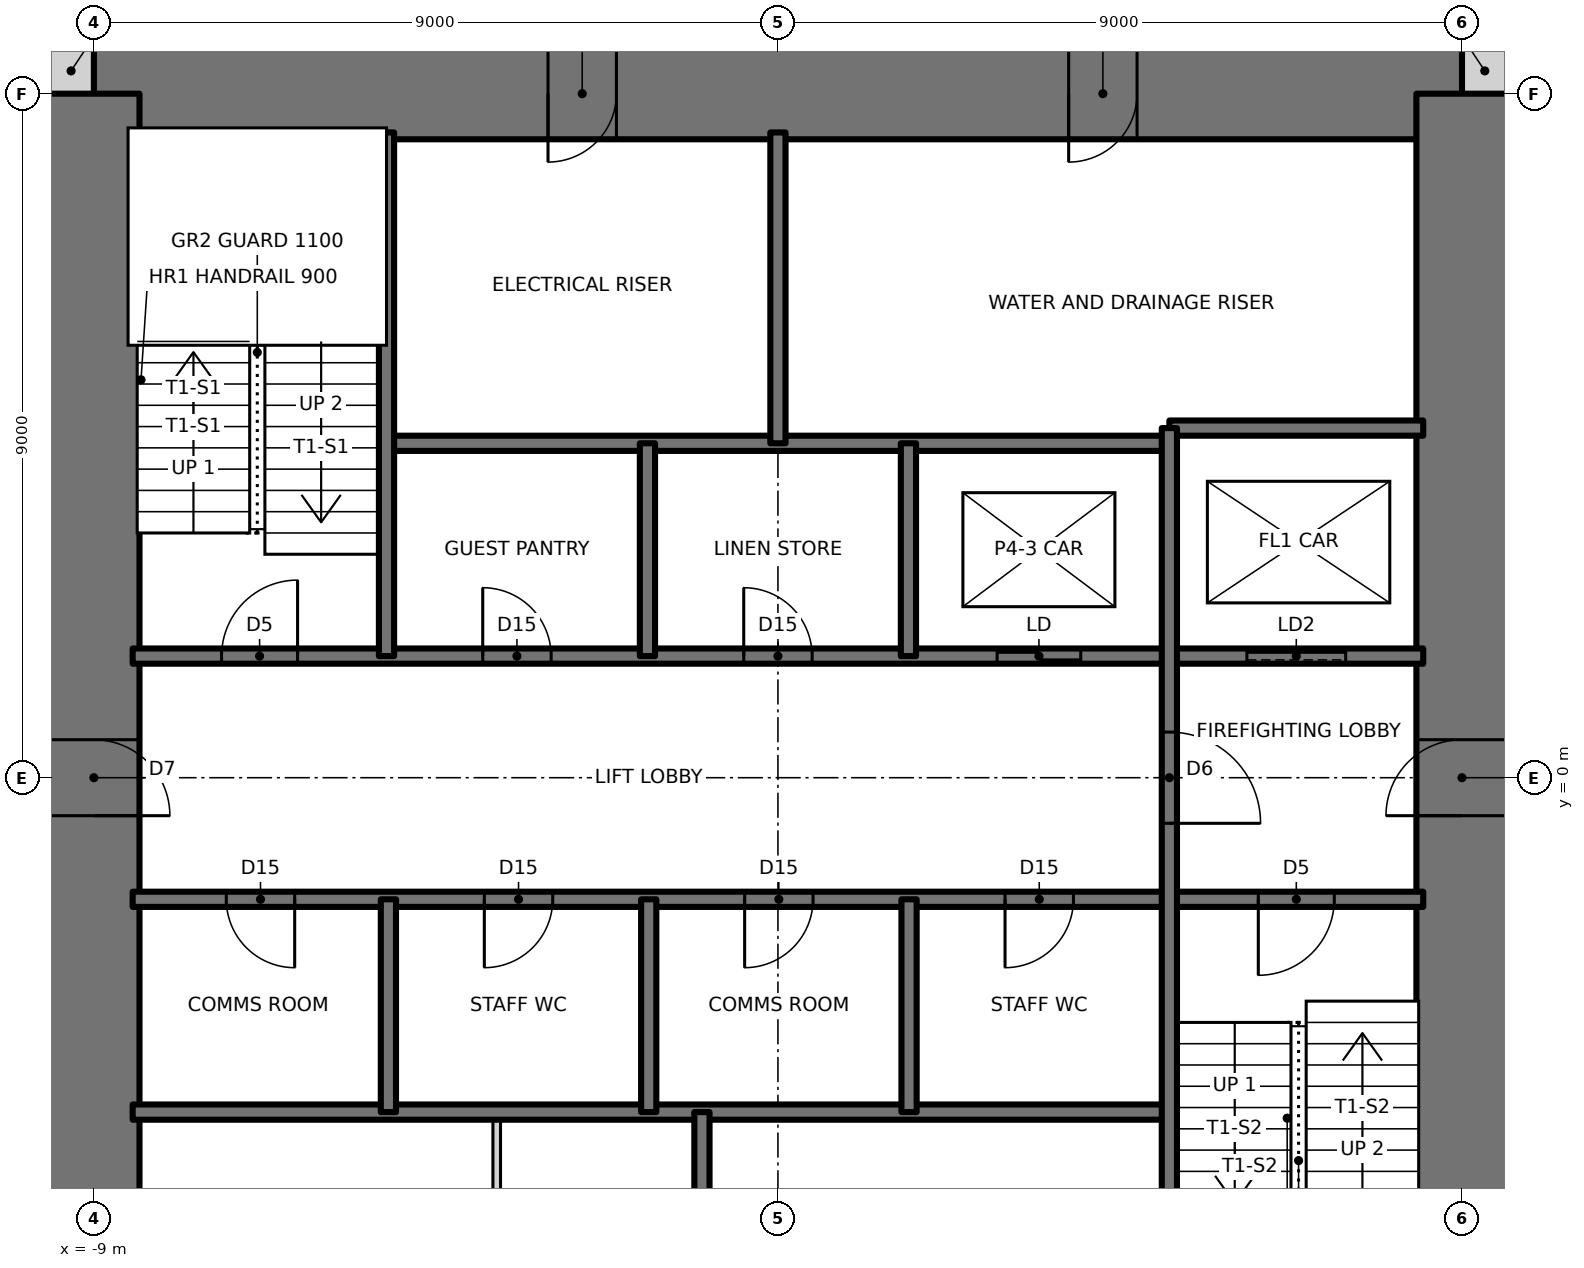
"""IFC4 building model, lengths in metres.
Left out: names, types, materials, properties, quantities, classifications, styles, units other than length and angle.
Written with IfcOpenShell. Run it as: python <this file> out.ifc"""

import sys

from ifc_helpers import new_model, si_unit, direction, frame, frame_2d, origin, place, context, subcontext, project, spatial, rectangle, extrude, element, fill, save


model = new_model("IFC4")
c1 = context("Model", 3, precision=1e-05, world=origin(), true_north=direction((0.0, 1.0)))
c2 = subcontext(c1, "Body", "Model", "MODEL_VIEW")
j1 = project(units=[si_unit("LENGTHUNIT", "METRE"), si_unit("PLANEANGLEUNIT", "RADIAN")], contexts=[c1])
p1 = place(None, origin())
s1 = spatial("IfcSite", under=j1, at=p1, CompositionType="ELEMENT")
p2 = place(p1, origin())
s2 = spatial("IfcBuilding", under=s1, at=p2, CompositionType="ELEMENT")
p3 = place(p2, frame((0.0, 0.0, 236.0)))
s3 = spatial("IfcBuildingStorey", under=s2, at=p3, CompositionType="ELEMENT", Elevation=236.0)
for number, where, z_axis, x_axis in (
    (1, (9.0, 9.3, 0.0), (0.0, 0.0, 1.0), (1.0, 0.0, 0.0)),
    (2, (-9.6, 9.3, 0.0), (0.0, 0.0, 1.0), (1.0, 0.0, 0.0)),
):
    element("IfcWall", number, at=place(p3, frame(where, z_axis=z_axis, x_axis=x_axis)), inside=s3, PredefinedType="SOLIDWALL", context=c2, shape_type="SweptSolid", body=[
        extrude(rectangle(XDim=0.6, YDim=0.6, at=frame_2d((0.3, 0.0))), origin(), (0.0, 0.0, 1.0), 3.5),
    ])
p4 = place(p3, frame((9.0, 9.0, 0.0), z_axis=(0.0, 0.0, 1.0), x_axis=(-1.0, 0.0, 0.0)))
e3 = element("IfcWall", 3, at=p4, inside=s3, PredefinedType="SHEAR", context=c2, shape_type="SweptSolid", body=[
    extrude(rectangle(XDim=18.0, YDim=1.2, at=frame_2d((9.0, 0.0))), origin(), (0.0, 0.0, 1.0), 3.5),
])
p5 = place(p4, frame((11.125, 0.0, 0.0)))
e4 = element("IfcOpeningElement", 4, at=p5, cuts=e3, PredefinedType="OPENING", context=c2, shape_type="SweptSolid", body=[
    extrude(rectangle(XDim=0.9, YDim=2.1, at=frame_2d((0.45, 1.05))), frame((0.0, 0.61, 0.0), z_axis=(0.0, -1.0, 0.0), x_axis=(1.0, 0.0, 0.0)), (0.0, 0.0, 1.0), 1.22),
])
p6 = place(p4, frame((4.275, 0.0, 0.0)))
e5 = element("IfcOpeningElement", 5, at=p6, cuts=e3, PredefinedType="OPENING", context=c2, shape_type="SweptSolid", body=[
    extrude(rectangle(XDim=0.9, YDim=2.1, at=frame_2d((0.45, 1.05))), frame((0.0, 0.61, 0.0), z_axis=(0.0, -1.0, 0.0), x_axis=(1.0, 0.0, 0.0)), (0.0, 0.0, 1.0), 1.22),
])
p7 = place(p3, frame((9.0, -9.0, 0.0), z_axis=(0.0, 0.0, 1.0), x_axis=(0.0, 1.0, 0.0)))
e6 = element("IfcWall", 6, at=p7, inside=s3, PredefinedType="SHEAR", context=c2, shape_type="SweptSolid", body=[
    extrude(rectangle(XDim=18.0, YDim=1.2, at=frame_2d((9.0, 0.0))), origin(), (0.0, 0.0, 1.0), 3.5),
])
p8 = place(p7, frame((8.5, 0.0, 0.0)))
e7 = element("IfcOpeningElement", 7, at=p8, cuts=e6, PredefinedType="OPENING", context=c2, shape_type="SweptSolid", body=[
    extrude(rectangle(XDim=1.0, YDim=2.1, at=frame_2d((0.5, 1.05))), frame((0.0, 0.61, 0.0), z_axis=(0.0, -1.0, 0.0), x_axis=(1.0, 0.0, 0.0)), (0.0, 0.0, 1.0), 1.22),
])
p9 = place(p3, frame((-9.0, 9.0, 0.0), z_axis=(0.0, 0.0, 1.0), x_axis=(0.0, -1.0, 0.0)))
e8 = element("IfcWall", 8, at=p9, inside=s3, PredefinedType="SHEAR", context=c2, shape_type="SweptSolid", body=[
    extrude(rectangle(XDim=18.0, YDim=1.2, at=frame_2d((9.0, 0.0))), origin(), (0.0, 0.0, 1.0), 3.5),
])
p10 = place(p9, frame((8.5, 0.0, 0.0)))
e9 = element("IfcOpeningElement", 9, at=p10, cuts=e8, PredefinedType="OPENING", context=c2, shape_type="SweptSolid", body=[
    extrude(rectangle(XDim=1.0, YDim=2.1, at=frame_2d((0.5, 1.05))), frame((0.0, 0.61, 0.0), z_axis=(0.0, -1.0, 0.0), x_axis=(1.0, 0.0, 0.0)), (0.0, 0.0, 1.0), 1.22),
])
p11 = place(p3, frame((-8.49, -4.4, 0.0), z_axis=(0.0, 0.0, 1.0), x_axis=(1.0, 0.0, 0.0)))
e10 = element("IfcWall", 10, at=p11, inside=s3, PredefinedType="SOLIDWALL", context=c2, shape_type="SweptSolid", body=[
    extrude(rectangle(XDim=13.64, YDim=0.2, at=frame_2d((6.82, 0.0))), origin(), (0.0, 0.0, 1.0), 3.5),
])
p12 = place(p3, frame((-8.49, -1.6, 0.0), z_axis=(0.0, 0.0, 1.0), x_axis=(1.0, 0.0, 0.0)))
e11 = element("IfcWall", 11, at=p12, inside=s3, PredefinedType="SOLIDWALL", context=c2, shape_type="SweptSolid", body=[
    extrude(rectangle(XDim=16.98, YDim=0.2, at=frame_2d((8.49, 0.0))), origin(), (0.0, 0.0, 1.0), 3.5),
])
p13 = place(p12, frame((14.81, 0.0, 0.0)))
e12 = element("IfcOpeningElement", 12, at=p13, cuts=e11, PredefinedType="OPENING", context=c2, shape_type="SweptSolid", body=[
    extrude(rectangle(XDim=1.0, YDim=2.1, at=frame_2d((0.5, 1.05))), frame((0.0, 0.11, 0.0), z_axis=(0.0, -1.0, 0.0), x_axis=(1.0, 0.0, 0.0)), (0.0, 0.0, 1.0), 0.22),
])
p14 = place(p12, frame((1.232, 0.0, 0.0)))
e13 = element("IfcOpeningElement", 13, at=p14, cuts=e11, PredefinedType="OPENING", context=c2, shape_type="SweptSolid", body=[
    extrude(rectangle(XDim=0.9, YDim=2.1, at=frame_2d((0.45, 1.05))), frame((0.0, 0.11, 0.0), z_axis=(0.0, -1.0, 0.0), x_axis=(1.0, 0.0, 0.0)), (0.0, 0.0, 1.0), 0.22),
])
p15 = place(p12, frame((4.627, 0.0, 0.0)))
e14 = element("IfcOpeningElement", 14, at=p15, cuts=e11, PredefinedType="OPENING", context=c2, shape_type="SweptSolid", body=[
    extrude(rectangle(XDim=0.9, YDim=2.1, at=frame_2d((0.45, 1.05))), frame((0.0, 0.11, 0.0), z_axis=(0.0, -1.0, 0.0), x_axis=(1.0, 0.0, 0.0)), (0.0, 0.0, 1.0), 0.22),
])
p16 = place(p12, frame((8.052, 0.0, 0.0)))
e15 = element("IfcOpeningElement", 15, at=p16, cuts=e11, PredefinedType="OPENING", context=c2, shape_type="SweptSolid", body=[
    extrude(rectangle(XDim=0.9, YDim=2.1, at=frame_2d((0.45, 1.05))), frame((0.0, 0.11, 0.0), z_axis=(0.0, -1.0, 0.0), x_axis=(1.0, 0.0, 0.0)), (0.0, 0.0, 1.0), 0.22),
])
p17 = place(p12, frame((11.478, 0.0, 0.0)))
e16 = element("IfcOpeningElement", 16, at=p17, cuts=e11, PredefinedType="OPENING", context=c2, shape_type="SweptSolid", body=[
    extrude(rectangle(XDim=0.9, YDim=2.1, at=frame_2d((0.45, 1.05))), frame((0.0, 0.11, 0.0), z_axis=(0.0, -1.0, 0.0), x_axis=(1.0, 0.0, 0.0)), (0.0, 0.0, 1.0), 0.22),
])
p18 = place(p3, frame((-8.49, 1.6, 0.0), z_axis=(0.0, 0.0, 1.0), x_axis=(1.0, 0.0, 0.0)))
e17 = element("IfcWall", 17, at=p18, inside=s3, PredefinedType="SOLIDWALL", context=c2, shape_type="SweptSolid", body=[
    extrude(rectangle(XDim=16.98, YDim=0.2, at=frame_2d((8.49, 0.0))), origin(), (0.0, 0.0, 1.0), 3.5),
])
p19 = place(p18, frame((1.17, 0.0, 0.0)))
e18 = element("IfcOpeningElement", 18, at=p19, cuts=e17, PredefinedType="OPENING", context=c2, shape_type="SweptSolid", body=[
    extrude(rectangle(XDim=1.0, YDim=2.1, at=frame_2d((0.5, 1.05))), frame((0.0, 0.11, 0.0), z_axis=(0.0, -1.0, 0.0), x_axis=(1.0, 0.0, 0.0)), (0.0, 0.0, 1.0), 0.22),
])
p20 = place(p18, frame((4.606, 0.0, 0.0)))
e19 = element("IfcOpeningElement", 19, at=p20, cuts=e17, PredefinedType="OPENING", context=c2, shape_type="SweptSolid", body=[
    extrude(rectangle(XDim=0.9, YDim=2.1, at=frame_2d((0.45, 1.05))), frame((0.0, 0.11, 0.0), z_axis=(0.0, -1.0, 0.0), x_axis=(1.0, 0.0, 0.0)), (0.0, 0.0, 1.0), 0.22),
])
p21 = place(p18, frame((8.04, 0.0, 0.0)))
e20 = element("IfcOpeningElement", 20, at=p21, cuts=e17, PredefinedType="OPENING", context=c2, shape_type="SweptSolid", body=[
    extrude(rectangle(XDim=0.9, YDim=2.1, at=frame_2d((0.45, 1.05))), frame((0.0, 0.11, 0.0), z_axis=(0.0, -1.0, 0.0), x_axis=(1.0, 0.0, 0.0)), (0.0, 0.0, 1.0), 0.22),
])
p22 = place(p18, frame((11.374, 0.0, 0.0)))
e21 = element("IfcOpeningElement", 21, at=p22, cuts=e17, PredefinedType="OPENING", context=c2, shape_type="SweptSolid", body=[
    extrude(rectangle(XDim=1.1, YDim=2.1, at=frame_2d((0.55, 1.05))), frame((0.0, 0.11, 0.0), z_axis=(0.0, -1.0, 0.0), x_axis=(1.0, 0.0, 0.0)), (0.0, 0.0, 1.0), 0.22),
])
p23 = place(p18, frame((14.66, 0.0, 0.0)))
e22 = element("IfcOpeningElement", 22, at=p23, cuts=e17, PredefinedType="OPENING", context=c2, shape_type="SweptSolid", body=[
    extrude(rectangle(XDim=1.3, YDim=2.1, at=frame_2d((0.65, 1.05))), frame((0.0, 0.11, 0.0), z_axis=(0.0, -1.0, 0.0), x_axis=(1.0, 0.0, 0.0)), (0.0, 0.0, 1.0), 0.22),
])
p24 = place(p3, frame((-5.15, 4.4, 0.0), z_axis=(0.0, 0.0, 1.0), x_axis=(1.0, 0.0, 0.0)))
e23 = element("IfcWall", 23, at=p24, inside=s3, PredefinedType="SOLIDWALL", context=c2, shape_type="SweptSolid", body=[
    extrude(rectangle(XDim=10.3, YDim=0.2, at=frame_2d((5.15, 0.0))), origin(), (0.0, 0.0, 1.0), 3.5),
])
p25 = place(p3, frame((5.15, 4.6, 0.0), z_axis=(0.0, 0.0, 1.0), x_axis=(1.0, 0.0, 0.0)))
e24 = element("IfcWall", 24, at=p25, inside=s3, PredefinedType="SOLIDWALL", context=c2, shape_type="SweptSolid", body=[
    extrude(rectangle(XDim=3.34, YDim=0.2, at=frame_2d((1.67, 0.0))), origin(), (0.0, 0.0, 1.0), 3.5),
])
p26 = place(p3, frame((5.15, -8.49, 0.0), z_axis=(0.0, 0.0, 1.0), x_axis=(0.0, 1.0, 0.0)))
e25 = element("IfcWall", 25, at=p26, inside=s3, PredefinedType="SOLIDWALL", context=c2, shape_type="SweptSolid", body=[
    extrude(rectangle(XDim=13.09, YDim=0.2, at=frame_2d((6.545, 0.0))), origin(), (0.0, 0.0, 1.0), 3.5),
])
p27 = place(p26, frame((7.89, 0.0, 0.0)))
e26 = element("IfcOpeningElement", 26, at=p27, cuts=e25, PredefinedType="OPENING", context=c2, shape_type="SweptSolid", body=[
    extrude(rectangle(XDim=1.2, YDim=2.1, at=frame_2d((0.6, 1.05))), frame((0.0, 0.11, 0.0), z_axis=(0.0, -1.0, 0.0), x_axis=(1.0, 0.0, 0.0)), (0.0, 0.0, 1.0), 0.22),
])
for number, where, z_axis, x_axis in (
    (27, (1.725, -4.4, 0.0), (0.0, 0.0, 1.0), (0.0, 1.0, 0.0)),
    (28, (1.717, 1.6, 0.0), (0.0, 0.0, 1.0), (0.0, 1.0, 0.0)),
):
    element("IfcWall", number, at=place(p3, frame(where, z_axis=z_axis, x_axis=x_axis)), inside=s3, PredefinedType="SOLIDWALL", context=c2, shape_type="SweptSolid", body=[
        extrude(rectangle(XDim=2.8, YDim=0.2, at=frame_2d((1.4, 0.0))), origin(), (0.0, 0.0, 1.0), 3.5),
    ])
for number, where, z_axis, x_axis in (
    (29, (0.0, 4.4, 0.0), (0.0, 0.0, 1.0), (0.0, 1.0, 0.0)),
    (30, (-1.0, -8.49, 0.0), (0.0, 0.0, 1.0), (0.0, 1.0, 0.0)),
):
    element("IfcWall", number, at=place(p3, frame(where, z_axis=z_axis, x_axis=x_axis)), inside=s3, PredefinedType="SOLIDWALL", context=c2, shape_type="SweptSolid", body=[
        extrude(rectangle(XDim=4.09, YDim=0.2, at=frame_2d((2.045, 0.0))), origin(), (0.0, 0.0, 1.0), 3.5),
    ])
for number, where, z_axis, x_axis in (
    (31, (-1.7, -4.4, 0.0), (0.0, 0.0, 1.0), (0.0, 1.0, 0.0)),
    (32, (-1.717, 1.6, 0.0), (0.0, 0.0, 1.0), (0.0, 1.0, 0.0)),
):
    element("IfcWall", number, at=place(p3, frame(where, z_axis=z_axis, x_axis=x_axis)), inside=s3, PredefinedType="SOLIDWALL", context=c2, shape_type="SweptSolid", body=[
        extrude(rectangle(XDim=2.8, YDim=0.2, at=frame_2d((1.4, 0.0))), origin(), (0.0, 0.0, 1.0), 3.5),
    ])
p28 = place(p3, frame((-3.7, -8.49, 0.0), z_axis=(0.0, 0.0, 1.0), x_axis=(0.0, 1.0, 0.0)))
e33 = element("IfcWall", 33, at=p28, inside=s3, PredefinedType="PARTITIONING", context=c2, shape_type="SweptSolid", body=[
    extrude(rectangle(XDim=4.09, YDim=0.1, at=frame_2d((2.045, 0.0))), origin(), (0.0, 0.0, 1.0), 3.3),
])
p29 = place(p28, frame((1.595, 0.0, 0.0)))
e34 = element("IfcOpeningElement", 34, at=p29, cuts=e33, PredefinedType="OPENING", context=c2, shape_type="SweptSolid", body=[
    extrude(rectangle(XDim=0.9, YDim=2.1, at=frame_2d((0.45, 1.05))), frame((0.0, 0.06, 0.0), z_axis=(0.0, -1.0, 0.0), x_axis=(1.0, 0.0, 0.0)), (0.0, 0.0, 1.0), 0.12),
])
p30 = place(p3, frame((-5.125, -4.4, 0.0), z_axis=(0.0, 0.0, 1.0), x_axis=(0.0, 1.0, 0.0)))
e35 = element("IfcWall", 35, at=p30, inside=s3, PredefinedType="SOLIDWALL", context=c2, shape_type="SweptSolid", body=[
    extrude(rectangle(XDim=2.8, YDim=0.2, at=frame_2d((1.4, 0.0))), origin(), (0.0, 0.0, 1.0), 3.5),
])
p31 = place(p3, frame((-5.15, 1.6, 0.0), z_axis=(0.0, 0.0, 1.0), x_axis=(0.0, 1.0, 0.0)))
e36 = element("IfcWall", 36, at=p31, inside=s3, PredefinedType="SOLIDWALL", context=c2, shape_type="SweptSolid", body=[
    extrude(rectangle(XDim=6.89, YDim=0.2, at=frame_2d((3.445, 0.0))), origin(), (0.0, 0.0, 1.0), 3.5),
])
p32 = place(p19, origin())
e37 = element("IfcDoor", 37, at=p32, inside=s3, OperationType="SINGLE_SWING_RIGHT", PredefinedType="DOOR", context=c2, shape_type="SweptSolid", body=[
    extrude(rectangle(XDim=1.0, YDim=2.1, at=frame_2d((0.5, 1.05))), frame((0.0, 0.025, 0.0), z_axis=(0.0, -1.0, 0.0), x_axis=(1.0, 0.0, 0.0)), (0.0, 0.0, 1.0), 0.05),
])
fill(e18, e37)
p33 = place(p13, frame((1.0, 0.0, 0.0), z_axis=(0.0, 0.0, 1.0), x_axis=(-1.0, 0.0, 0.0)))
e38 = element("IfcDoor", 38, at=p33, inside=s3, OperationType="SINGLE_SWING_RIGHT", PredefinedType="DOOR", context=c2, shape_type="SweptSolid", body=[
    extrude(rectangle(XDim=1.0, YDim=2.1, at=frame_2d((0.5, 1.05))), frame((0.0, 0.025, 0.0), z_axis=(0.0, -1.0, 0.0), x_axis=(1.0, 0.0, 0.0)), (0.0, 0.0, 1.0), 0.05),
])
fill(e12, e38)
p34 = place(p27, frame((1.2, 0.0, 0.0), z_axis=(0.0, 0.0, 1.0), x_axis=(-1.0, 0.0, 0.0)))
e39 = element("IfcDoor", 39, at=p34, inside=s3, OperationType="SINGLE_SWING_RIGHT", PredefinedType="DOOR", context=c2, shape_type="SweptSolid", body=[
    extrude(rectangle(XDim=1.2, YDim=2.1, at=frame_2d((0.6, 1.05))), frame((0.0, 0.025, 0.0), z_axis=(0.0, -1.0, 0.0), x_axis=(1.0, 0.0, 0.0)), (0.0, 0.0, 1.0), 0.05),
])
fill(e26, e39)
p35 = place(p20, origin())
e40 = element("IfcDoor", 40, at=p35, inside=s3, OperationType="SINGLE_SWING_LEFT", PredefinedType="DOOR", context=c2, shape_type="SweptSolid", body=[
    extrude(rectangle(XDim=0.9, YDim=2.1, at=frame_2d((0.45, 1.05))), frame((0.0, 0.025, 0.0), z_axis=(0.0, -1.0, 0.0), x_axis=(1.0, 0.0, 0.0)), (0.0, 0.0, 1.0), 0.05),
])
fill(e19, e40)
p36 = place(p21, origin())
e41 = element("IfcDoor", 41, at=p36, inside=s3, OperationType="SINGLE_SWING_LEFT", PredefinedType="DOOR", context=c2, shape_type="SweptSolid", body=[
    extrude(rectangle(XDim=0.9, YDim=2.1, at=frame_2d((0.45, 1.05))), frame((0.0, 0.025, 0.0), z_axis=(0.0, -1.0, 0.0), x_axis=(1.0, 0.0, 0.0)), (0.0, 0.0, 1.0), 0.05),
])
fill(e20, e41)
p37 = place(p14, frame((0.9, 0.0, 0.0), z_axis=(0.0, 0.0, 1.0), x_axis=(-1.0, 0.0, 0.0)))
e42 = element("IfcDoor", 42, at=p37, inside=s3, OperationType="SINGLE_SWING_LEFT", PredefinedType="DOOR", context=c2, shape_type="SweptSolid", body=[
    extrude(rectangle(XDim=0.9, YDim=2.1, at=frame_2d((0.45, 1.05))), frame((0.0, 0.025, 0.0), z_axis=(0.0, -1.0, 0.0), x_axis=(1.0, 0.0, 0.0)), (0.0, 0.0, 1.0), 0.05),
])
fill(e13, e42)
p38 = place(p15, frame((0.9, 0.0, 0.0), z_axis=(0.0, 0.0, 1.0), x_axis=(-1.0, 0.0, 0.0)))
e43 = element("IfcDoor", 43, at=p38, inside=s3, OperationType="SINGLE_SWING_RIGHT", PredefinedType="DOOR", context=c2, shape_type="SweptSolid", body=[
    extrude(rectangle(XDim=0.9, YDim=2.1, at=frame_2d((0.45, 1.05))), frame((0.0, 0.025, 0.0), z_axis=(0.0, -1.0, 0.0), x_axis=(1.0, 0.0, 0.0)), (0.0, 0.0, 1.0), 0.05),
])
fill(e14, e43)
p39 = place(p16, frame((0.9, 0.0, 0.0), z_axis=(0.0, 0.0, 1.0), x_axis=(-1.0, 0.0, 0.0)))
e44 = element("IfcDoor", 44, at=p39, inside=s3, OperationType="SINGLE_SWING_RIGHT", PredefinedType="DOOR", context=c2, shape_type="SweptSolid", body=[
    extrude(rectangle(XDim=0.9, YDim=2.1, at=frame_2d((0.45, 1.05))), frame((0.0, 0.025, 0.0), z_axis=(0.0, -1.0, 0.0), x_axis=(1.0, 0.0, 0.0)), (0.0, 0.0, 1.0), 0.05),
])
fill(e15, e44)
p40 = place(p17, frame((0.9, 0.0, 0.0), z_axis=(0.0, 0.0, 1.0), x_axis=(-1.0, 0.0, 0.0)))
e45 = element("IfcDoor", 45, at=p40, inside=s3, OperationType="SINGLE_SWING_RIGHT", PredefinedType="DOOR", context=c2, shape_type="SweptSolid", body=[
    extrude(rectangle(XDim=0.9, YDim=2.1, at=frame_2d((0.45, 1.05))), frame((0.0, 0.025, 0.0), z_axis=(0.0, -1.0, 0.0), x_axis=(1.0, 0.0, 0.0)), (0.0, 0.0, 1.0), 0.05),
])
fill(e16, e45)
p41 = place(p10, origin())
e46 = element("IfcDoor", 46, at=p41, inside=s3, OperationType="SINGLE_SWING_RIGHT", PredefinedType="DOOR", context=c2, shape_type="SweptSolid", body=[
    extrude(rectangle(XDim=1.0, YDim=2.1, at=frame_2d((0.5, 1.05))), frame((0.0, 0.025, 0.0), z_axis=(0.0, -1.0, 0.0), x_axis=(1.0, 0.0, 0.0)), (0.0, 0.0, 1.0), 0.05),
])
fill(e9, e46)
p42 = place(p8, origin())
e47 = element("IfcDoor", 47, at=p42, inside=s3, OperationType="SINGLE_SWING_LEFT", PredefinedType="DOOR", context=c2, shape_type="SweptSolid", body=[
    extrude(rectangle(XDim=1.0, YDim=2.1, at=frame_2d((0.5, 1.05))), frame((0.0, 0.025, 0.0), z_axis=(0.0, -1.0, 0.0), x_axis=(1.0, 0.0, 0.0)), (0.0, 0.0, 1.0), 0.05),
])
fill(e7, e47)
p43 = place(p5, origin())
e48 = element("IfcDoor", 48, at=p43, inside=s3, OperationType="SINGLE_SWING_RIGHT", PredefinedType="DOOR", context=c2, shape_type="SweptSolid", body=[
    extrude(rectangle(XDim=0.9, YDim=2.1, at=frame_2d((0.45, 1.05))), frame((0.0, 0.025, 0.0), z_axis=(0.0, -1.0, 0.0), x_axis=(1.0, 0.0, 0.0)), (0.0, 0.0, 1.0), 0.05),
])
fill(e4, e48)
p44 = place(p6, origin())
e49 = element("IfcDoor", 49, at=p44, inside=s3, OperationType="SINGLE_SWING_RIGHT", PredefinedType="DOOR", context=c2, shape_type="SweptSolid", body=[
    extrude(rectangle(XDim=0.9, YDim=2.1, at=frame_2d((0.45, 1.05))), frame((0.0, 0.025, 0.0), z_axis=(0.0, -1.0, 0.0), x_axis=(1.0, 0.0, 0.0)), (0.0, 0.0, 1.0), 0.05),
])
fill(e5, e49)
p45 = place(p22, origin())
e50 = element("IfcDoor", 50, at=p45, inside=s3, OperationType="DOUBLE_DOOR_SLIDING", PredefinedType="DOOR", context=c2, shape_type="SweptSolid", body=[
    extrude(rectangle(XDim=1.1, YDim=2.1, at=frame_2d((0.55, 1.05))), frame((0.0, 0.025, 0.0), z_axis=(0.0, -1.0, 0.0), x_axis=(1.0, 0.0, 0.0)), (0.0, 0.0, 1.0), 0.05),
])
fill(e21, e50)
p46 = place(p23, origin())
e51 = element("IfcDoor", 51, at=p46, inside=s3, OperationType="SLIDING_TO_LEFT", PredefinedType="DOOR", context=c2, shape_type="SweptSolid", body=[
    extrude(rectangle(XDim=1.3, YDim=2.1, at=frame_2d((0.65, 1.05))), frame((0.0, 0.025, 0.0), z_axis=(0.0, -1.0, 0.0), x_axis=(1.0, 0.0, 0.0)), (0.0, 0.0, 1.0), 0.05),
])
fill(e22, e51)
save(model, sys.argv[1])
